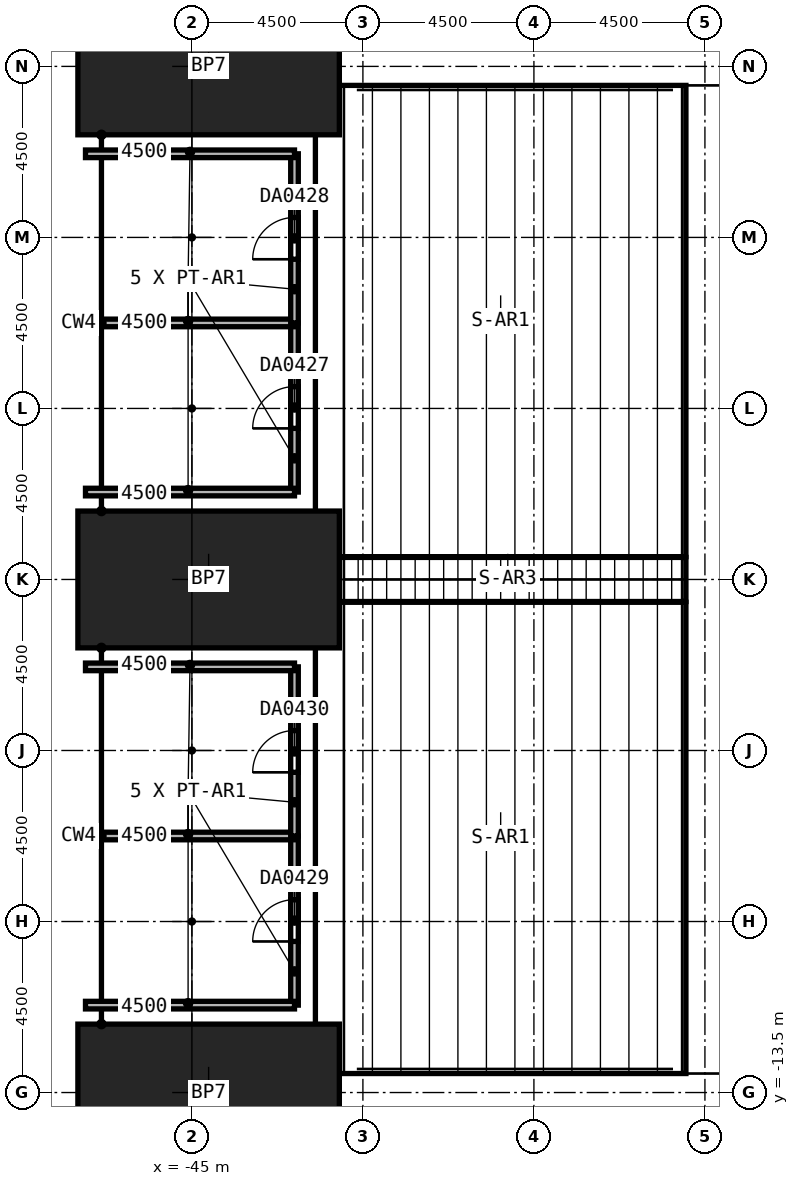
"""IFC4 building model, lengths in metres.
Left out: names, types, materials, properties, quantities, classifications, styles, units other than length and angle.
Written with IfcOpenShell. Run it as: python <this file> out.ifc"""

import sys

from ifc_helpers import new_model, si_unit, direction, frame, frame_2d, origin, origin_2d, place, context, subcontext, project, spatial, rectangle, extrude, element, fill, save


model = new_model("IFC4")
c1 = context("Model", 3, precision=1e-05, world=origin(), true_north=direction((0.0, 1.0)))
c2 = subcontext(c1, "Body", "Model", "MODEL_VIEW")
j1 = project(units=[si_unit("LENGTHUNIT", "METRE"), si_unit("PLANEANGLEUNIT", "RADIAN")], contexts=[c1])
p1 = place(None, origin())
s1 = spatial("IfcSite", under=j1, at=p1, CompositionType="ELEMENT")
p2 = place(p1, origin())
s2 = spatial("IfcBuilding", under=s1, at=p2, CompositionType="ELEMENT")
p3 = place(p2, frame((0.0, 0.0, 31.0)))
s3 = spatial("IfcBuildingStorey", under=s2, at=p3, CompositionType="ELEMENT", Elevation=31.0)
for number, where, z_axis, x_axis in (
    (1, (-44.56, -13.5, 0.0), (0.0, 0.0, 1.0), (0.0, -1.0, 0.0)),
    (2, (-44.56, 0.0, 0.0), (0.0, 0.0, 1.0), (0.0, -1.0, 0.0)),
    (3, (-44.56, 13.5, 0.0), (0.0, 0.0, 1.0), (0.0, -1.0, 0.0)),
):
    element("IfcColumn", number, at=place(p3, frame(where, z_axis=z_axis, x_axis=x_axis)), inside=s3, PredefinedType="COLUMN", context=c2, shape_type="SweptSolid", body=[
        extrude(rectangle(XDim=3.6, YDim=6.88, at=origin_2d()), origin(), (0.0, 0.0, 1.0), 6.0),
    ])
p4 = place(p3, frame((-42.3, 2.3, 0.0), z_axis=(0.0, 0.0, 1.0), x_axis=(0.0, 1.0, 0.0)))
e4 = element("IfcWall", 4, at=p4, inside=s3, PredefinedType="PARTITIONING", context=c2, shape_type="SweptSolid", body=[
    extrude(rectangle(XDim=4.45, YDim=0.2, at=frame_2d((2.225, 0.0))), origin(), (0.0, 0.0, 1.0), 5.7),
])
p5 = place(p4, frame((1.675, 0.0, 0.0)))
e5 = element("IfcOpeningElement", 5, at=p5, cuts=e4, PredefinedType="OPENING", context=c2, shape_type="SweptSolid", body=[
    extrude(rectangle(XDim=1.1, YDim=2.4, at=frame_2d((0.55, 1.2))), frame((0.0, 0.1, 0.0), z_axis=(0.0, -1.0, 0.0), x_axis=(1.0, 0.0, 0.0)), (0.0, 0.0, 1.0), 0.2),
])
for number, where, z_axis, x_axis in (
    (6, (-42.3, 2.3, 0.0), (0.0, 0.0, 1.0), (-1.0, 0.0, 0.0)),
    (7, (-47.8, 6.75, 0.0), (0.0, 0.0, 1.0), (1.0, 0.0, 0.0)),
):
    element("IfcWall", number, at=place(p3, frame(where, z_axis=z_axis, x_axis=x_axis)), inside=s3, PredefinedType="PARTITIONING", context=c2, shape_type="SweptSolid", body=[
        extrude(rectangle(XDim=5.5, YDim=0.2, at=frame_2d((2.75, 0.0))), origin(), (0.0, 0.0, 1.0), 5.7),
    ])
p6 = place(p3, frame((-42.3, 6.75, 0.0), z_axis=(0.0, 0.0, 1.0), x_axis=(0.0, 1.0, 0.0)))
e8 = element("IfcWall", 8, at=p6, inside=s3, PredefinedType="PARTITIONING", context=c2, shape_type="SweptSolid", body=[
    extrude(rectangle(XDim=4.45, YDim=0.2, at=frame_2d((2.225, 0.0))), origin(), (0.0, 0.0, 1.0), 5.7),
])
p7 = place(p6, frame((1.675, 0.0, 0.0)))
e9 = element("IfcOpeningElement", 9, at=p7, cuts=e8, PredefinedType="OPENING", context=c2, shape_type="SweptSolid", body=[
    extrude(rectangle(XDim=1.1, YDim=2.4, at=frame_2d((0.55, 1.2))), frame((0.0, 0.1, 0.0), z_axis=(0.0, -1.0, 0.0), x_axis=(1.0, 0.0, 0.0)), (0.0, 0.0, 1.0), 0.2),
])
p8 = place(p3, frame((-42.3, 11.2, 0.0), z_axis=(0.0, 0.0, 1.0), x_axis=(-1.0, 0.0, 0.0)))
e10 = element("IfcWall", 10, at=p8, inside=s3, PredefinedType="PARTITIONING", context=c2, shape_type="SweptSolid", body=[
    extrude(rectangle(XDim=5.5, YDim=0.2, at=frame_2d((2.75, 0.0))), origin(), (0.0, 0.0, 1.0), 5.7),
])
p9 = place(p3, frame((-42.3, -11.2, 0.0), z_axis=(0.0, 0.0, 1.0), x_axis=(0.0, 1.0, 0.0)))
e11 = element("IfcWall", 11, at=p9, inside=s3, PredefinedType="PARTITIONING", context=c2, shape_type="SweptSolid", body=[
    extrude(rectangle(XDim=4.45, YDim=0.2, at=frame_2d((2.225, 0.0))), origin(), (0.0, 0.0, 1.0), 5.7),
])
p10 = place(p9, frame((1.675, 0.0, 0.0)))
e12 = element("IfcOpeningElement", 12, at=p10, cuts=e11, PredefinedType="OPENING", context=c2, shape_type="SweptSolid", body=[
    extrude(rectangle(XDim=1.1, YDim=2.4, at=frame_2d((0.55, 1.2))), frame((0.0, 0.1, 0.0), z_axis=(0.0, -1.0, 0.0), x_axis=(1.0, 0.0, 0.0)), (0.0, 0.0, 1.0), 0.2),
])
for number, where, z_axis, x_axis in (
    (13, (-42.3, -11.2, 0.0), (0.0, 0.0, 1.0), (-1.0, 0.0, 0.0)),
    (14, (-47.8, -6.75, 0.0), (0.0, 0.0, 1.0), (1.0, 0.0, 0.0)),
):
    element("IfcWall", number, at=place(p3, frame(where, z_axis=z_axis, x_axis=x_axis)), inside=s3, PredefinedType="PARTITIONING", context=c2, shape_type="SweptSolid", body=[
        extrude(rectangle(XDim=5.5, YDim=0.2, at=frame_2d((2.75, 0.0))), origin(), (0.0, 0.0, 1.0), 5.7),
    ])
p11 = place(p3, frame((-42.3, -6.75, 0.0), z_axis=(0.0, 0.0, 1.0), x_axis=(0.0, 1.0, 0.0)))
e15 = element("IfcWall", 15, at=p11, inside=s3, PredefinedType="PARTITIONING", context=c2, shape_type="SweptSolid", body=[
    extrude(rectangle(XDim=4.45, YDim=0.2, at=frame_2d((2.225, 0.0))), origin(), (0.0, 0.0, 1.0), 5.7),
])
p12 = place(p11, frame((1.675, 0.0, 0.0)))
e16 = element("IfcOpeningElement", 16, at=p12, cuts=e15, PredefinedType="OPENING", context=c2, shape_type="SweptSolid", body=[
    extrude(rectangle(XDim=1.1, YDim=2.4, at=frame_2d((0.55, 1.2))), frame((0.0, 0.1, 0.0), z_axis=(0.0, -1.0, 0.0), x_axis=(1.0, 0.0, 0.0)), (0.0, 0.0, 1.0), 0.2),
])
p13 = place(p3, frame((-42.3, -2.3, 0.0), z_axis=(0.0, 0.0, 1.0), x_axis=(-1.0, 0.0, 0.0)))
e17 = element("IfcWall", 17, at=p13, inside=s3, PredefinedType="PARTITIONING", context=c2, shape_type="SweptSolid", body=[
    extrude(rectangle(XDim=5.5, YDim=0.2, at=frame_2d((2.75, 0.0))), origin(), (0.0, 0.0, 1.0), 5.7),
])
p14 = place(p5, origin())
e18 = element("IfcDoor", 18, at=p14, inside=s3, OperationType="DOUBLE_DOOR_SINGLE_SWING", PredefinedType="DOOR", context=c2, shape_type="SweptSolid", body=[
    extrude(rectangle(XDim=1.1, YDim=2.4, at=frame_2d((0.55, 1.2))), frame((0.0, 0.025, 0.0), z_axis=(0.0, -1.0, 0.0), x_axis=(1.0, 0.0, 0.0)), (0.0, 0.0, 1.0), 0.05),
])
fill(e5, e18)
p15 = place(p7, origin())
e19 = element("IfcDoor", 19, at=p15, inside=s3, OperationType="DOUBLE_DOOR_SINGLE_SWING", PredefinedType="DOOR", context=c2, shape_type="SweptSolid", body=[
    extrude(rectangle(XDim=1.1, YDim=2.4, at=frame_2d((0.55, 1.2))), frame((0.0, 0.025, 0.0), z_axis=(0.0, -1.0, 0.0), x_axis=(1.0, 0.0, 0.0)), (0.0, 0.0, 1.0), 0.05),
])
fill(e9, e19)
p16 = place(p10, origin())
e20 = element("IfcDoor", 20, at=p16, inside=s3, OperationType="DOUBLE_DOOR_SINGLE_SWING", PredefinedType="DOOR", context=c2, shape_type="SweptSolid", body=[
    extrude(rectangle(XDim=1.1, YDim=2.4, at=frame_2d((0.55, 1.2))), frame((0.0, 0.025, 0.0), z_axis=(0.0, -1.0, 0.0), x_axis=(1.0, 0.0, 0.0)), (0.0, 0.0, 1.0), 0.05),
])
fill(e12, e20)
p17 = place(p12, origin())
e21 = element("IfcDoor", 21, at=p17, inside=s3, OperationType="DOUBLE_DOOR_SINGLE_SWING", PredefinedType="DOOR", context=c2, shape_type="SweptSolid", body=[
    extrude(rectangle(XDim=1.1, YDim=2.4, at=frame_2d((0.55, 1.2))), frame((0.0, 0.025, 0.0), z_axis=(0.0, -1.0, 0.0), x_axis=(1.0, 0.0, 0.0)), (0.0, 0.0, 1.0), 0.05),
])
fill(e16, e21)
save(model, sys.argv[1])
